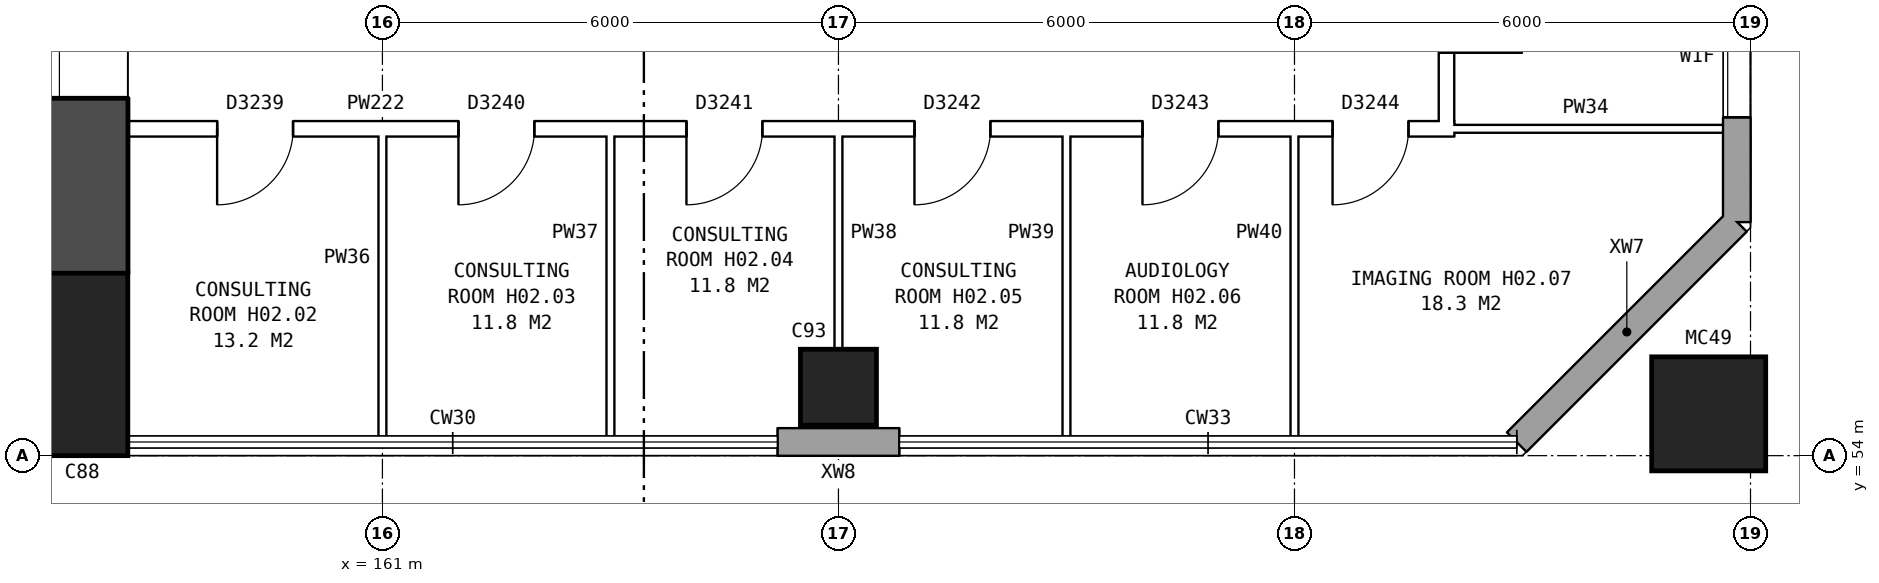
"""IFC4 building model, lengths in metres.
Left out: names, types, materials, properties, quantities, classifications, styles, units other than length and angle.
Written with IfcOpenShell. Run it as: python <this file> out.ifc"""

import sys

from ifc_helpers import new_model, si_unit, direction, frame, frame_2d, origin, origin_2d, place, context, subcontext, project, spatial, rectangle, hollow_rectangle, extrude, element, fill, save


model = new_model("IFC4")
c1 = context("Model", 3, precision=1e-05, world=origin(), true_north=direction((0.0, 1.0)))
c2 = subcontext(c1, "Body", "Model", "MODEL_VIEW")
j1 = project(units=[si_unit("LENGTHUNIT", "METRE"), si_unit("PLANEANGLEUNIT", "RADIAN")], contexts=[c1])
p1 = place(None, origin())
s1 = spatial("IfcSite", under=j1, at=p1, CompositionType="ELEMENT")
p2 = place(p1, origin())
s2 = spatial("IfcBuilding", under=s1, at=p2, CompositionType="ELEMENT")
p3 = place(p2, frame((0.0, 0.0, 10.1)))
s3 = spatial("IfcBuildingStorey", under=s2, at=p3, CompositionType="ELEMENT", Elevation=10.1)
p4 = place(p3, frame((157.05, 55.2, -0.3), z_axis=(0.0, 0.0, 1.0), x_axis=(1.0, 0.0, 0.0)))
e1 = element("IfcColumn", 1, at=p4, inside=s3, PredefinedType="COLUMN", context=c2, shape_type="SweptSolid", body=[
    extrude(rectangle(XDim=1.2, YDim=2.4, at=origin_2d()), origin(), (0.0, 0.0, 1.0), 4.4),
])
p5 = place(p3, frame((157.05, 56.4, -0.3), z_axis=(0.0, 0.0, 1.0), x_axis=(0.0, 1.0, 0.0)))
e2 = element("IfcWall", 2, at=p5, inside=s3, PredefinedType="SHEAR", context=c2, shape_type="SweptSolid", body=[
    extrude(rectangle(XDim=27.2, YDim=1.2, at=frame_2d((13.6, 0.0))), origin(), (0.0, 0.0, 1.0), 4.4),
])
p6 = place(p5, frame((2.3, 0.0, 0.8)))
e3 = element("IfcOpeningElement", 3, at=p6, cuts=e2, PredefinedType="OPENING", context=c2, shape_type="SweptSolid", body=[
    extrude(rectangle(XDim=1.6, YDim=1.8, at=frame_2d((0.8, 0.9))), frame((0.0, 0.61, 0.0), z_axis=(0.0, -1.0, 0.0), x_axis=(1.0, 0.0, 0.0)), (0.0, 0.0, 1.0), 1.22),
])
p7 = place(p5, frame((5.3, 0.0, 0.8)))
e4 = element("IfcOpeningElement", 4, at=p7, cuts=e2, PredefinedType="OPENING", context=c2, shape_type="SweptSolid", body=[
    extrude(rectangle(XDim=1.6, YDim=1.8, at=frame_2d((0.8, 0.9))), frame((0.0, 0.61, 0.0), z_axis=(0.0, -1.0, 0.0), x_axis=(1.0, 0.0, 0.0)), (0.0, 0.0, 1.0), 1.22),
])
p8 = place(p5, frame((8.3, 0.0, 0.8)))
e5 = element("IfcOpeningElement", 5, at=p8, cuts=e2, PredefinedType="OPENING", context=c2, shape_type="SweptSolid", body=[
    extrude(rectangle(XDim=1.6, YDim=1.8, at=frame_2d((0.8, 0.9))), frame((0.0, 0.61, 0.0), z_axis=(0.0, -1.0, 0.0), x_axis=(1.0, 0.0, 0.0)), (0.0, 0.0, 1.0), 1.22),
])
p9 = place(p5, frame((11.3, 0.0, 0.8)))
e6 = element("IfcOpeningElement", 6, at=p9, cuts=e2, PredefinedType="OPENING", context=c2, shape_type="SweptSolid", body=[
    extrude(rectangle(XDim=1.6, YDim=1.8, at=frame_2d((0.8, 0.9))), frame((0.0, 0.61, 0.0), z_axis=(0.0, -1.0, 0.0), x_axis=(1.0, 0.0, 0.0)), (0.0, 0.0, 1.0), 1.22),
])
p10 = place(p5, frame((14.3, 0.0, 0.8)))
e7 = element("IfcOpeningElement", 7, at=p10, cuts=e2, PredefinedType="OPENING", context=c2, shape_type="SweptSolid", body=[
    extrude(rectangle(XDim=1.6, YDim=1.8, at=frame_2d((0.8, 0.9))), frame((0.0, 0.61, 0.0), z_axis=(0.0, -1.0, 0.0), x_axis=(1.0, 0.0, 0.0)), (0.0, 0.0, 1.0), 1.22),
])
p11 = place(p5, frame((17.3, 0.0, 0.8)))
e8 = element("IfcOpeningElement", 8, at=p11, cuts=e2, PredefinedType="OPENING", context=c2, shape_type="SweptSolid", body=[
    extrude(rectangle(XDim=1.6, YDim=1.8, at=frame_2d((0.8, 0.9))), frame((0.0, 0.61, 0.0), z_axis=(0.0, -1.0, 0.0), x_axis=(1.0, 0.0, 0.0)), (0.0, 0.0, 1.0), 1.22),
])
p12 = place(p5, frame((20.3, 0.0, 0.8)))
e9 = element("IfcOpeningElement", 9, at=p12, cuts=e2, PredefinedType="OPENING", context=c2, shape_type="SweptSolid", body=[
    extrude(rectangle(XDim=1.6, YDim=1.8, at=frame_2d((0.8, 0.9))), frame((0.0, 0.61, 0.0), z_axis=(0.0, -1.0, 0.0), x_axis=(1.0, 0.0, 0.0)), (0.0, 0.0, 1.0), 1.22),
])
p13 = place(p5, frame((23.3, 0.0, 0.8)))
e10 = element("IfcOpeningElement", 10, at=p13, cuts=e2, PredefinedType="OPENING", context=c2, shape_type="SweptSolid", body=[
    extrude(rectangle(XDim=1.6, YDim=1.8, at=frame_2d((0.8, 0.9))), frame((0.0, 0.61, 0.0), z_axis=(0.0, -1.0, 0.0), x_axis=(1.0, 0.0, 0.0)), (0.0, 0.0, 1.0), 1.22),
])
p14 = place(p3, frame((167.0, 54.9, 0.0), z_axis=(0.0, 0.0, 1.0), x_axis=(1.0, 0.0, 0.0)))
e11 = element("IfcColumn", 11, at=p14, inside=s3, PredefinedType="COLUMN", context=c2, shape_type="SweptSolid", body=[
    extrude(rectangle(XDim=1.0, YDim=1.0, at=origin_2d()), origin(), (0.0, 0.0, 1.0), 4.3),
])
p15 = place(p3, frame((178.45, 54.55, 0.0), z_axis=(0.0, 0.0, 1.0), x_axis=(1.0, 0.0, 0.0)))
e12 = element("IfcColumn", 12, at=p15, inside=s3, PredefinedType="COLUMN", context=c2, shape_type="SweptSolid", body=[
    extrude(hollow_rectangle(XDim=1.5, YDim=1.5, WallThickness=0.08, at=origin_2d()), origin(), (0.0, 0.0, 1.0), 4.6),
])
p16 = place(p3, frame((166.2, 54.18, 0.0), z_axis=(0.0, 0.0, 1.0), x_axis=(1.0, 0.0, 0.0)))
e13 = element("IfcWall", 13, at=p16, inside=s3, PredefinedType="STANDARD", context=c2, shape_type="SweptSolid", body=[
    extrude(rectangle(XDim=1.6, YDim=0.36, at=frame_2d((0.8, 0.0))), origin(), (0.0, 0.0, 1.0), 4.3),
])
p17 = place(p3, frame((175.925, 54.18, 0.0), z_axis=(0.0, 0.0, 1.0), x_axis=(0.707106781187, 0.707106781187, 0.0)))
e14 = element("IfcWall", 14, at=p17, inside=s3, PredefinedType="STANDARD", context=c2, shape_type="SweptSolid", body=[
    extrude(rectangle(XDim=4.094, YDim=0.36, at=frame_2d((2.047, 0.0))), origin(), (0.0, 0.0, 1.0), 4.3),
])
p18 = place(p3, frame((178.82, 57.075, 0.0), z_axis=(0.0, 0.0, 1.0), x_axis=(0.0, 1.0, 0.0)))
e15 = element("IfcWall", 15, at=p18, inside=s3, PredefinedType="STANDARD", context=c2, shape_type="SweptSolid", body=[
    extrude(rectangle(XDim=25.851, YDim=0.36, at=frame_2d((12.925, 0.0))), origin(), (0.0, 0.0, 1.0), 4.3),
])
p19 = place(p18, frame((1.375, 0.0, 0.8)))
e16 = element("IfcOpeningElement", 16, at=p19, cuts=e15, PredefinedType="OPENING", context=c2, shape_type="SweptSolid", body=[
    extrude(rectangle(XDim=1.6, YDim=1.5, at=frame_2d((0.8, 0.75))), frame((0.0, 0.19, 0.0), z_axis=(0.0, -1.0, 0.0), x_axis=(1.0, 0.0, 0.0)), (0.0, 0.0, 1.0), 0.38),
])
p20 = place(p18, frame((4.375, 0.0, 0.8)))
e17 = element("IfcOpeningElement", 17, at=p20, cuts=e15, PredefinedType="OPENING", context=c2, shape_type="SweptSolid", body=[
    extrude(rectangle(XDim=0.6, YDim=0.9, at=frame_2d((0.3, 0.45))), frame((0.0, 0.19, 0.0), z_axis=(0.0, -1.0, 0.0), x_axis=(1.0, 0.0, 0.0)), (0.0, 0.0, 1.0), 0.38),
])
p21 = place(p18, frame((7.375, 0.0, 1.7)))
e18 = element("IfcOpeningElement", 18, at=p21, cuts=e15, PredefinedType="OPENING", context=c2, shape_type="SweptSolid", body=[
    extrude(rectangle(XDim=1.0, YDim=0.9, at=frame_2d((0.5, 0.45))), frame((0.0, 0.19, 0.0), z_axis=(0.0, -1.0, 0.0), x_axis=(1.0, 0.0, 0.0)), (0.0, 0.0, 1.0), 0.38),
])
p22 = place(p18, frame((10.625, 0.0, 0.8)))
e19 = element("IfcOpeningElement", 19, at=p22, cuts=e15, PredefinedType="OPENING", context=c2, shape_type="SweptSolid", body=[
    extrude(rectangle(XDim=1.6, YDim=1.8, at=frame_2d((0.8, 0.9))), frame((0.0, 0.19, 0.0), z_axis=(0.0, -1.0, 0.0), x_axis=(1.0, 0.0, 0.0)), (0.0, 0.0, 1.0), 0.38),
])
p23 = place(p18, frame((13.625, 0.0, 0.8)))
e20 = element("IfcOpeningElement", 20, at=p23, cuts=e15, PredefinedType="OPENING", context=c2, shape_type="SweptSolid", body=[
    extrude(rectangle(XDim=1.6, YDim=1.8, at=frame_2d((0.8, 0.9))), frame((0.0, 0.19, 0.0), z_axis=(0.0, -1.0, 0.0), x_axis=(1.0, 0.0, 0.0)), (0.0, 0.0, 1.0), 0.38),
])
p24 = place(p18, frame((16.375, 0.0, 1.4)))
e21 = element("IfcOpeningElement", 21, at=p24, cuts=e15, PredefinedType="OPENING", context=c2, shape_type="SweptSolid", body=[
    extrude(rectangle(XDim=1.0, YDim=1.2, at=frame_2d((0.5, 0.6))), frame((0.0, 0.19, 0.0), z_axis=(0.0, -1.0, 0.0), x_axis=(1.0, 0.0, 0.0)), (0.0, 0.0, 1.0), 0.38),
])
p25 = place(p18, frame((20.725, 0.0, 0.8)))
e22 = element("IfcOpeningElement", 22, at=p25, cuts=e15, PredefinedType="OPENING", context=c2, shape_type="SweptSolid", body=[
    extrude(rectangle(XDim=0.6, YDim=0.9, at=frame_2d((0.3, 0.45))), frame((0.0, 0.19, 0.0), z_axis=(0.0, -1.0, 0.0), x_axis=(1.0, 0.0, 0.0)), (0.0, 0.0, 1.0), 0.38),
])
p26 = place(p18, frame((21.775, 0.0, 0.8)))
e23 = element("IfcOpeningElement", 23, at=p26, cuts=e15, PredefinedType="OPENING", context=c2, shape_type="SweptSolid", body=[
    extrude(rectangle(XDim=0.8, YDim=1.2, at=frame_2d((0.4, 0.6))), frame((0.0, 0.19, 0.0), z_axis=(0.0, -1.0, 0.0), x_axis=(1.0, 0.0, 0.0)), (0.0, 0.0, 1.0), 0.38),
])
p27 = place(p18, frame((3.275, 0.0, 0.8)))
e24 = element("IfcOpeningElement", 24, at=p27, cuts=e15, PredefinedType="OPENING", context=c2, shape_type="SweptSolid", body=[
    extrude(rectangle(XDim=0.8, YDim=1.2, at=frame_2d((0.4, 0.6))), frame((0.0, 0.19, 0.0), z_axis=(0.0, -1.0, 0.0), x_axis=(1.0, 0.0, 0.0)), (0.0, 0.0, 1.0), 0.38),
])
p28 = place(p18, frame((8.675, 0.0, 1.4)))
e25 = element("IfcOpeningElement", 25, at=p28, cuts=e15, PredefinedType="OPENING", context=c2, shape_type="SweptSolid", body=[
    extrude(rectangle(XDim=1.6, YDim=1.2, at=frame_2d((0.8, 0.6))), frame((0.0, 0.19, 0.0), z_axis=(0.0, -1.0, 0.0), x_axis=(1.0, 0.0, 0.0)), (0.0, 0.0, 1.0), 0.38),
])
p29 = place(p18, frame((17.675, 0.0, 1.7)))
e26 = element("IfcOpeningElement", 26, at=p29, cuts=e15, PredefinedType="OPENING", context=c2, shape_type="SweptSolid", body=[
    extrude(rectangle(XDim=0.8, YDim=0.9, at=frame_2d((0.4, 0.45))), frame((0.0, 0.19, 0.0), z_axis=(0.0, -1.0, 0.0), x_axis=(1.0, 0.0, 0.0)), (0.0, 0.0, 1.0), 0.38),
])
p30 = place(p18, frame((22.875, 0.0, 0.8)))
e27 = element("IfcOpeningElement", 27, at=p30, cuts=e15, PredefinedType="OPENING", context=c2, shape_type="SweptSolid", body=[
    extrude(rectangle(XDim=1.6, YDim=1.5, at=frame_2d((0.8, 0.75))), frame((0.0, 0.19, 0.0), z_axis=(0.0, -1.0, 0.0), x_axis=(1.0, 0.0, 0.0)), (0.0, 0.0, 1.0), 0.38),
])
p31 = place(p3, frame((157.53, 58.3, 0.0), z_axis=(0.0, 0.0, 1.0), x_axis=(1.0, 0.0, 0.0)))
e28 = element("IfcWall", 28, at=p31, inside=s3, PredefinedType="PARTITIONING", context=c2, shape_type="SweptSolid", body=[
    extrude(rectangle(XDim=17.572, YDim=0.2, at=frame_2d((8.786, 0.0))), origin(), (0.0, 0.0, 1.0), 4.3),
])
p32 = place(p31, frame((1.295, 0.0, 0.0)))
e29 = element("IfcOpeningElement", 29, at=p32, cuts=e28, PredefinedType="OPENING", context=c2, shape_type="SweptSolid", body=[
    extrude(rectangle(XDim=1.0, YDim=2.1, at=frame_2d((0.5, 1.05))), frame((0.0, 0.11, 0.0), z_axis=(0.0, -1.0, 0.0), x_axis=(1.0, 0.0, 0.0)), (0.0, 0.0, 1.0), 0.22),
])
p33 = place(p31, frame((4.47, 0.0, 0.0)))
e30 = element("IfcOpeningElement", 30, at=p33, cuts=e28, PredefinedType="OPENING", context=c2, shape_type="SweptSolid", body=[
    extrude(rectangle(XDim=1.0, YDim=2.1, at=frame_2d((0.5, 1.05))), frame((0.0, 0.11, 0.0), z_axis=(0.0, -1.0, 0.0), x_axis=(1.0, 0.0, 0.0)), (0.0, 0.0, 1.0), 0.22),
])
p34 = place(p31, frame((7.47, 0.0, 0.0)))
e31 = element("IfcOpeningElement", 31, at=p34, cuts=e28, PredefinedType="OPENING", context=c2, shape_type="SweptSolid", body=[
    extrude(rectangle(XDim=1.0, YDim=2.1, at=frame_2d((0.5, 1.05))), frame((0.0, 0.11, 0.0), z_axis=(0.0, -1.0, 0.0), x_axis=(1.0, 0.0, 0.0)), (0.0, 0.0, 1.0), 0.22),
])
p35 = place(p31, frame((10.47, 0.0, 0.0)))
e32 = element("IfcOpeningElement", 32, at=p35, cuts=e28, PredefinedType="OPENING", context=c2, shape_type="SweptSolid", body=[
    extrude(rectangle(XDim=1.0, YDim=2.1, at=frame_2d((0.5, 1.05))), frame((0.0, 0.11, 0.0), z_axis=(0.0, -1.0, 0.0), x_axis=(1.0, 0.0, 0.0)), (0.0, 0.0, 1.0), 0.22),
])
p36 = place(p31, frame((13.47, 0.0, 0.0)))
e33 = element("IfcOpeningElement", 33, at=p36, cuts=e28, PredefinedType="OPENING", context=c2, shape_type="SweptSolid", body=[
    extrude(rectangle(XDim=1.0, YDim=2.1, at=frame_2d((0.5, 1.05))), frame((0.0, 0.11, 0.0), z_axis=(0.0, -1.0, 0.0), x_axis=(1.0, 0.0, 0.0)), (0.0, 0.0, 1.0), 0.22),
])
p37 = place(p31, frame((15.971, 0.0, 0.0)))
e34 = element("IfcOpeningElement", 34, at=p37, cuts=e28, PredefinedType="OPENING", context=c2, shape_type="SweptSolid", body=[
    extrude(rectangle(XDim=1.0, YDim=2.1, at=frame_2d((0.5, 1.05))), frame((0.0, 0.11, 0.0), z_axis=(0.0, -1.0, 0.0), x_axis=(1.0, 0.0, 0.0)), (0.0, 0.0, 1.0), 0.22),
])
p38 = place(p3, frame((174.9, 58.3, 0.0), z_axis=(0.0, 0.0, 1.0), x_axis=(1.0, 0.0, 0.0)))
e35 = element("IfcWall", 35, at=p38, inside=s3, PredefinedType="PARTITIONING", context=c2, shape_type="SweptSolid", body=[
    extrude(rectangle(XDim=3.86, YDim=0.1, at=frame_2d((1.93, 0.0))), origin(), (0.0, 0.0, 1.0), 4.3),
])
for number, where, z_axis, x_axis in (
    (36, (161.0, 54.24, 0.0), (0.0, 0.0, 1.0), (0.0, 1.0, 0.0)),
    (37, (164.0, 54.24, 0.0), (0.0, 0.0, 1.0), (0.0, 1.0, 0.0)),
    (38, (167.0, 54.24, 0.0), (0.0, 0.0, 1.0), (0.0, 1.0, 0.0)),
    (39, (170.0, 54.24, 0.0), (0.0, 0.0, 1.0), (0.0, 1.0, 0.0)),
    (40, (173.0, 54.24, 0.0), (0.0, 0.0, 1.0), (0.0, 1.0, 0.0)),
):
    element("IfcWall", number, at=place(p3, frame(where, z_axis=z_axis, x_axis=x_axis)), inside=s3, PredefinedType="PARTITIONING", context=c2, shape_type="SweptSolid", body=[
        extrude(rectangle(XDim=4.16, YDim=0.1, at=frame_2d((2.08, 0.0))), origin(), (0.0, 0.0, 1.0), 4.3),
    ])
p39 = place(p3, frame((175.0, 58.2, 0.0), z_axis=(0.0, 0.0, 1.0), x_axis=(0.0, 1.0, 0.0)))
e41 = element("IfcWall", 41, at=p39, inside=s3, PredefinedType="PARTITIONING", context=c2, shape_type="SweptSolid", body=[
    extrude(rectangle(XDim=23.6, YDim=0.2, at=frame_2d((11.8, 0.0))), origin(), (0.0, 0.0, 1.0), 4.3),
])
p40 = place(p39, frame((1.1, 0.0, 0.0)))
e42 = element("IfcOpeningElement", 42, at=p40, cuts=e41, PredefinedType="OPENING", context=c2, shape_type="SweptSolid", body=[
    extrude(rectangle(XDim=1.0, YDim=2.1, at=frame_2d((0.5, 1.05))), frame((0.0, 0.11, 0.0), z_axis=(0.0, -1.0, 0.0), x_axis=(1.0, 0.0, 0.0)), (0.0, 0.0, 1.0), 0.22),
])
p41 = place(p39, frame((4.1, 0.0, 0.0)))
e43 = element("IfcOpeningElement", 43, at=p41, cuts=e41, PredefinedType="OPENING", context=c2, shape_type="SweptSolid", body=[
    extrude(rectangle(XDim=1.0, YDim=2.1, at=frame_2d((0.5, 1.05))), frame((0.0, 0.11, 0.0), z_axis=(0.0, -1.0, 0.0), x_axis=(1.0, 0.0, 0.0)), (0.0, 0.0, 1.0), 0.22),
])
p42 = place(p39, frame((8.525, 0.0, 0.0)))
e44 = element("IfcOpeningElement", 44, at=p42, cuts=e41, PredefinedType="OPENING", context=c2, shape_type="SweptSolid", body=[
    extrude(rectangle(XDim=1.0, YDim=2.1, at=frame_2d((0.5, 1.05))), frame((0.0, 0.11, 0.0), z_axis=(0.0, -1.0, 0.0), x_axis=(1.0, 0.0, 0.0)), (0.0, 0.0, 1.0), 0.22),
])
p43 = place(p39, frame((13.025, 0.0, 0.0)))
e45 = element("IfcOpeningElement", 45, at=p43, cuts=e41, PredefinedType="OPENING", context=c2, shape_type="SweptSolid", body=[
    extrude(rectangle(XDim=1.0, YDim=2.1, at=frame_2d((0.5, 1.05))), frame((0.0, 0.11, 0.0), z_axis=(0.0, -1.0, 0.0), x_axis=(1.0, 0.0, 0.0)), (0.0, 0.0, 1.0), 0.22),
])
p44 = place(p39, frame((16.1, 0.0, 0.0)))
e46 = element("IfcOpeningElement", 46, at=p44, cuts=e41, PredefinedType="OPENING", context=c2, shape_type="SweptSolid", body=[
    extrude(rectangle(XDim=1.0, YDim=2.1, at=frame_2d((0.5, 1.05))), frame((0.0, 0.11, 0.0), z_axis=(0.0, -1.0, 0.0), x_axis=(1.0, 0.0, 0.0)), (0.0, 0.0, 1.0), 0.22),
])
p45 = place(p39, frame((20.3, 0.0, 0.0)))
e47 = element("IfcOpeningElement", 47, at=p45, cuts=e41, PredefinedType="OPENING", context=c2, shape_type="SweptSolid", body=[
    extrude(rectangle(XDim=1.0, YDim=2.1, at=frame_2d((0.5, 1.05))), frame((0.0, 0.11, 0.0), z_axis=(0.0, -1.0, 0.0), x_axis=(1.0, 0.0, 0.0)), (0.0, 0.0, 1.0), 0.22),
])
p46 = place(p19, origin())
e48 = element("IfcWindow", 48, at=p46, inside=s3, PartitioningType="SINGLE_PANEL", PredefinedType="WINDOW", context=c2, shape_type="SweptSolid", body=[
    extrude(rectangle(XDim=1.6, YDim=1.5, at=frame_2d((0.8, 0.75))), frame((0.0, 0.15, 0.0), z_axis=(0.0, -1.0, 0.0), x_axis=(1.0, 0.0, 0.0)), (0.0, 0.0, 1.0), 0.06),
])
fill(e16, e48)
p47 = place(p6, origin())
e49 = element("IfcWindow", 49, at=p47, inside=s3, PartitioningType="SINGLE_PANEL", PredefinedType="WINDOW", context=c2, shape_type="SweptSolid", body=[
    extrude(rectangle(XDim=1.6, YDim=1.8, at=frame_2d((0.8, 0.9))), frame((0.0, 0.33, 0.0), z_axis=(0.0, -1.0, 0.0), x_axis=(1.0, 0.0, 0.0)), (0.0, 0.0, 1.0), 0.06),
])
fill(e3, e49)
p48 = place(p32, frame((1.0, 0.0, 0.0), z_axis=(0.0, 0.0, 1.0), x_axis=(-1.0, 0.0, 0.0)))
e50 = element("IfcDoor", 50, at=p48, inside=s3, OperationType="SINGLE_SWING_RIGHT", PredefinedType="DOOR", context=c2, shape_type="SweptSolid", body=[
    extrude(rectangle(XDim=1.0, YDim=2.1, at=frame_2d((0.5, 1.05))), frame((0.0, 0.025, 0.0), z_axis=(0.0, -1.0, 0.0), x_axis=(1.0, 0.0, 0.0)), (0.0, 0.0, 1.0), 0.05),
])
fill(e29, e50)
p49 = place(p33, frame((1.0, 0.0, 0.0), z_axis=(0.0, 0.0, 1.0), x_axis=(-1.0, 0.0, 0.0)))
e51 = element("IfcDoor", 51, at=p49, inside=s3, OperationType="SINGLE_SWING_RIGHT", PredefinedType="DOOR", context=c2, shape_type="SweptSolid", body=[
    extrude(rectangle(XDim=1.0, YDim=2.1, at=frame_2d((0.5, 1.05))), frame((0.0, 0.025, 0.0), z_axis=(0.0, -1.0, 0.0), x_axis=(1.0, 0.0, 0.0)), (0.0, 0.0, 1.0), 0.05),
])
fill(e30, e51)
p50 = place(p34, frame((1.0, 0.0, 0.0), z_axis=(0.0, 0.0, 1.0), x_axis=(-1.0, 0.0, 0.0)))
e52 = element("IfcDoor", 52, at=p50, inside=s3, OperationType="SINGLE_SWING_RIGHT", PredefinedType="DOOR", context=c2, shape_type="SweptSolid", body=[
    extrude(rectangle(XDim=1.0, YDim=2.1, at=frame_2d((0.5, 1.05))), frame((0.0, 0.025, 0.0), z_axis=(0.0, -1.0, 0.0), x_axis=(1.0, 0.0, 0.0)), (0.0, 0.0, 1.0), 0.05),
])
fill(e31, e52)
p51 = place(p35, frame((1.0, 0.0, 0.0), z_axis=(0.0, 0.0, 1.0), x_axis=(-1.0, 0.0, 0.0)))
e53 = element("IfcDoor", 53, at=p51, inside=s3, OperationType="SINGLE_SWING_RIGHT", PredefinedType="DOOR", context=c2, shape_type="SweptSolid", body=[
    extrude(rectangle(XDim=1.0, YDim=2.1, at=frame_2d((0.5, 1.05))), frame((0.0, 0.025, 0.0), z_axis=(0.0, -1.0, 0.0), x_axis=(1.0, 0.0, 0.0)), (0.0, 0.0, 1.0), 0.05),
])
fill(e32, e53)
p52 = place(p36, frame((1.0, 0.0, 0.0), z_axis=(0.0, 0.0, 1.0), x_axis=(-1.0, 0.0, 0.0)))
e54 = element("IfcDoor", 54, at=p52, inside=s3, OperationType="SINGLE_SWING_RIGHT", PredefinedType="DOOR", context=c2, shape_type="SweptSolid", body=[
    extrude(rectangle(XDim=1.0, YDim=2.1, at=frame_2d((0.5, 1.05))), frame((0.0, 0.025, 0.0), z_axis=(0.0, -1.0, 0.0), x_axis=(1.0, 0.0, 0.0)), (0.0, 0.0, 1.0), 0.05),
])
fill(e33, e54)
p53 = place(p37, frame((1.0, 0.0, 0.0), z_axis=(0.0, 0.0, 1.0), x_axis=(-1.0, 0.0, 0.0)))
e55 = element("IfcDoor", 55, at=p53, inside=s3, OperationType="SINGLE_SWING_RIGHT", PredefinedType="DOOR", context=c2, shape_type="SweptSolid", body=[
    extrude(rectangle(XDim=1.0, YDim=2.1, at=frame_2d((0.5, 1.05))), frame((0.0, 0.025, 0.0), z_axis=(0.0, -1.0, 0.0), x_axis=(1.0, 0.0, 0.0)), (0.0, 0.0, 1.0), 0.05),
])
fill(e34, e55)
save(model, sys.argv[1])
